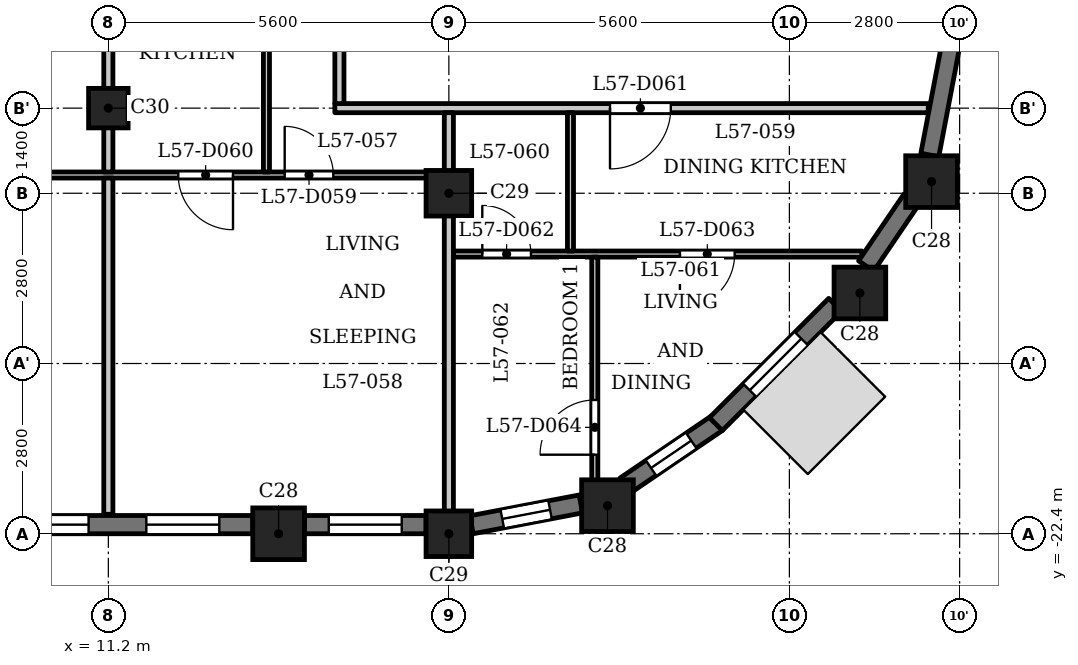
"""IFC4 building model, lengths in metres.
Left out: names, types, materials, properties, quantities, classifications, styles, units other than length and angle.
Written with IfcOpenShell. Run it as: python <this file> out.ifc"""

import sys

from ifc_helpers import new_model, si_unit, direction, frame, frame_2d, origin, origin_2d, place, context, subcontext, project, spatial, rectangle, extrude, element, fill, save


model = new_model("IFC4")
c1 = context("Model", 3, precision=1e-05, world=origin(), true_north=direction((0.0, 1.0)))
c2 = subcontext(c1, "Body", "Model", "MODEL_VIEW")
j1 = project(units=[si_unit("LENGTHUNIT", "METRE"), si_unit("PLANEANGLEUNIT", "RADIAN")], contexts=[c1])
p1 = place(None, origin())
s1 = spatial("IfcSite", under=j1, at=p1, CompositionType="ELEMENT")
p2 = place(p1, origin())
s2 = spatial("IfcBuilding", under=s1, at=p2, CompositionType="ELEMENT")
p3 = place(p2, frame((0.0, 0.0, 220.4)))
s3 = spatial("IfcBuildingStorey", under=s2, at=p3, CompositionType="ELEMENT", Elevation=220.4)
for number, where, z_axis, x_axis in (
    (1, (14.0, -22.4, 0.0), (0.0, 0.0, 1.0), (1.0, 0.0, 0.0)),
    (2, (19.409, -21.938, 0.0), (0.0, 0.0, 1.0), (1.0, 0.0, 0.0)),
    (3, (23.56, -18.44, 0.0), (0.0, 0.0, 1.0), (1.0, 0.0, 0.0)),
    (4, (24.738, -16.609, 0.0), (0.0, 0.0, 1.0), (1.0, 0.0, 0.0)),
):
    element("IfcColumn", number, at=place(p3, frame(where, z_axis=z_axis, x_axis=x_axis)), inside=s3, PredefinedType="COLUMN", context=c2, shape_type="SweptSolid", body=[
        extrude(rectangle(XDim=0.85, YDim=0.85, at=origin_2d()), origin(), (0.0, 0.0, 1.0), 3.5),
    ])
for number, where, z_axis, x_axis in (
    (5, (16.8, -22.4, 0.0), (0.0, 0.0, 1.0), (1.0, 0.0, 0.0)),
    (6, (16.8, -16.8, 0.0), (0.0, 0.0, 1.0), (1.0, 0.0, 0.0)),
):
    element("IfcColumn", number, at=place(p3, frame(where, z_axis=z_axis, x_axis=x_axis)), inside=s3, PredefinedType="COLUMN", context=c2, shape_type="SweptSolid", body=[
        extrude(rectangle(XDim=0.75, YDim=0.75, at=origin_2d()), origin(), (0.0, 0.0, 1.0), 3.5),
    ])
p4 = place(p3, frame((11.2, -15.4, 0.0), z_axis=(0.0, 0.0, 1.0), x_axis=(1.0, 0.0, 0.0)))
e7 = element("IfcColumn", 7, at=p4, inside=s3, PredefinedType="COLUMN", context=c2, shape_type="SweptSolid", body=[
    extrude(rectangle(XDim=0.65, YDim=0.65, at=origin_2d()), origin(), (0.0, 0.0, 1.0), 3.5),
])
p5 = place(p3, frame((8.825, -22.25, 0.0), z_axis=(0.0, 0.0, 1.0), x_axis=(1.0, 0.0, 0.0)))
e8 = element("IfcWall", 8, at=p5, inside=s3, PredefinedType="SOLIDWALL", context=c2, shape_type="SweptSolid", body=[
    extrude(rectangle(XDim=4.75, YDim=0.3, at=frame_2d((2.375, 0.0))), origin(), (0.0, 0.0, 1.0), 2.5),
])
p6 = place(p5, frame((0.25, 0.0, 0.9)))
e9 = element("IfcOpeningElement", 9, at=p6, cuts=e8, PredefinedType="OPENING", context=c2, shape_type="SweptSolid", body=[
    extrude(rectangle(XDim=1.8, YDim=1.25, at=frame_2d((0.9, 0.625))), frame((0.0, 0.16, 0.0), z_axis=(0.0, -1.0, 0.0), x_axis=(1.0, 0.0, 0.0)), (0.0, 0.0, 1.0), 0.32),
])
p7 = place(p5, frame((3.0, 0.0, 0.6)))
e10 = element("IfcOpeningElement", 10, at=p7, cuts=e8, PredefinedType="OPENING", context=c2, shape_type="SweptSolid", body=[
    extrude(rectangle(XDim=1.2, YDim=1.55, at=frame_2d((0.6, 0.775))), frame((0.0, 0.16, 0.0), z_axis=(0.0, -1.0, 0.0), x_axis=(1.0, 0.0, 0.0)), (0.0, 0.0, 1.0), 0.32),
])
p8 = place(p3, frame((14.425, -22.25, 0.0), z_axis=(0.0, 0.0, 1.0), x_axis=(1.0, 0.0, 0.0)))
e11 = element("IfcWall", 11, at=p8, inside=s3, PredefinedType="SOLIDWALL", context=c2, shape_type="SweptSolid", body=[
    extrude(rectangle(XDim=2.0, YDim=0.3, at=frame_2d((1.0, 0.0))), origin(), (0.0, 0.0, 1.0), 2.5),
])
p9 = place(p8, frame((0.4, 0.0, 0.6)))
e12 = element("IfcOpeningElement", 12, at=p9, cuts=e11, PredefinedType="OPENING", context=c2, shape_type="SweptSolid", body=[
    extrude(rectangle(XDim=1.2, YDim=1.55, at=frame_2d((0.6, 0.775))), frame((0.0, 0.16, 0.0), z_axis=(0.0, -1.0, 0.0), x_axis=(1.0, 0.0, 0.0)), (0.0, 0.0, 1.0), 0.32),
])
p10 = place(p3, frame((17.172, -22.253, 0.0), z_axis=(0.0, 0.0, 1.0), x_axis=(0.982300037503, 0.187314271538, 0.0)))
e13 = element("IfcWall", 13, at=p10, inside=s3, PredefinedType="SOLIDWALL", context=c2, shape_type="SweptSolid", body=[
    extrude(rectangle(XDim=1.831, YDim=0.3, at=frame_2d((0.916, 0.0))), origin(), (0.0, 0.0, 1.0), 2.5),
])
p11 = place(p10, frame((0.516, 0.0, 0.6)))
e14 = element("IfcOpeningElement", 14, at=p11, cuts=e13, PredefinedType="OPENING", context=c2, shape_type="SweptSolid", body=[
    extrude(rectangle(XDim=0.8, YDim=1.55, at=frame_2d((0.4, 0.775))), frame((0.0, 0.16, 0.0), z_axis=(0.0, -1.0, 0.0), x_axis=(1.0, 0.0, 0.0)), (0.0, 0.0, 1.0), 0.32),
])
p12 = place(p3, frame((19.698, -21.608, 0.0), z_axis=(0.0, 0.0, 1.0), x_axis=(0.82705295608, 0.562124014644, 0.0)))
e15 = element("IfcWall", 15, at=p12, inside=s3, PredefinedType="SOLIDWALL", context=c2, shape_type="SweptSolid", body=[
    extrude(rectangle(XDim=1.831, YDim=0.3, at=frame_2d((0.916, 0.0))), origin(), (0.0, 0.0, 1.0), 2.5),
])
p13 = place(p12, frame((0.516, 0.0, 0.6)))
e16 = element("IfcOpeningElement", 16, at=p13, cuts=e15, PredefinedType="OPENING", context=c2, shape_type="SweptSolid", body=[
    extrude(rectangle(XDim=0.8, YDim=1.55, at=frame_2d((0.4, 0.775))), frame((0.0, 0.16, 0.0), z_axis=(0.0, -1.0, 0.0), x_axis=(1.0, 0.0, 0.0)), (0.0, 0.0, 1.0), 0.32),
])
p14 = place(p3, frame((21.191, -20.597, 0.0), z_axis=(0.0, 0.0, 1.0), x_axis=(0.707150767798, 0.707062791838, 0.0)))
e17 = element("IfcWall", 17, at=p14, inside=s3, PredefinedType="SOLIDWALL", context=c2, shape_type="SweptSolid", body=[
    extrude(rectangle(XDim=2.775, YDim=0.3, at=frame_2d((1.388, 0.0))), origin(), (0.0, 0.0, 1.0), 2.5),
])
p15 = place(p14, frame((0.788, 0.0, 0.6)))
e18 = element("IfcOpeningElement", 18, at=p15, cuts=e17, PredefinedType="OPENING", context=c2, shape_type="SweptSolid", body=[
    extrude(rectangle(XDim=1.2, YDim=1.55, at=frame_2d((0.6, 0.775))), frame((0.0, 0.16, 0.0), z_axis=(0.0, -1.0, 0.0), x_axis=(1.0, 0.0, 0.0)), (0.0, 0.0, 1.0), 0.32),
])
p16 = place(p3, frame((23.662, -17.996, 0.0), z_axis=(0.0, 0.0, 1.0), x_axis=(0.562149004813, 0.827035970432, 0.0)))
e19 = element("IfcWall", 19, at=p16, inside=s3, PredefinedType="SOLIDWALL", context=c2, shape_type="SweptSolid", body=[
    extrude(rectangle(XDim=1.327, YDim=0.3, at=frame_2d((0.664, 0.0))), origin(), (0.0, 0.0, 1.0), 2.5),
])
p17 = place(p3, frame((24.709, -16.171, 0.0), z_axis=(0.0, 0.0, 1.0), x_axis=(0.187442908742, 0.982275499014, 0.0)))
e20 = element("IfcWall", 20, at=p17, inside=s3, PredefinedType="SOLIDWALL", context=c2, shape_type="SweptSolid", body=[
    extrude(rectangle(XDim=1.831, YDim=0.3, at=frame_2d((0.916, 0.0))), origin(), (0.0, 0.0, 1.0), 2.5),
])
p18 = place(p3, frame((16.875, -17.8, 0.0), z_axis=(0.0, 0.0, 1.0), x_axis=(1.0, 0.0, 0.0)))
e21 = element("IfcWall", 21, at=p18, inside=s3, PredefinedType="PARTITIONING", context=c2, shape_type="SweptSolid", body=[
    extrude(rectangle(XDim=6.719, YDim=0.1, at=frame_2d((3.359, 0.0))), origin(), (0.0, 0.0, 1.0), 3.2),
])
p19 = place(p18, frame((0.475, 0.0, 0.0)))
e22 = element("IfcOpeningElement", 22, at=p19, cuts=e21, PredefinedType="OPENING", context=c2, shape_type="SweptSolid", body=[
    extrude(rectangle(XDim=0.8, YDim=2.1, at=frame_2d((0.4, 1.05))), frame((0.0, 0.06, 0.0), z_axis=(0.0, -1.0, 0.0), x_axis=(1.0, 0.0, 0.0)), (0.0, 0.0, 1.0), 0.12),
])
p20 = place(p18, frame((3.725, 0.0, 0.0)))
e23 = element("IfcOpeningElement", 23, at=p20, cuts=e21, PredefinedType="OPENING", context=c2, shape_type="SweptSolid", body=[
    extrude(rectangle(XDim=0.9, YDim=2.1, at=frame_2d((0.45, 1.05))), frame((0.0, 0.06, 0.0), z_axis=(0.0, -1.0, 0.0), x_axis=(1.0, 0.0, 0.0)), (0.0, 0.0, 1.0), 0.12),
])
p21 = place(p3, frame((-16.725, -16.5, 0.0), z_axis=(0.0, 0.0, 1.0), x_axis=(1.0, 0.0, 0.0)))
e24 = element("IfcWall", 24, at=p21, inside=s3, PredefinedType="PARTITIONING", context=c2, shape_type="SweptSolid", body=[
    extrude(rectangle(XDim=33.45, YDim=0.1, at=frame_2d((16.725, 0.0))), origin(), (0.0, 0.0, 1.0), 3.2),
])
p22 = place(p21, frame((0.675, 0.0, 0.0)))
e25 = element("IfcOpeningElement", 25, at=p22, cuts=e24, PredefinedType="OPENING", context=c2, shape_type="SweptSolid", body=[
    extrude(rectangle(XDim=0.8, YDim=2.1, at=frame_2d((0.4, 1.05))), frame((0.0, 0.06, 0.0), z_axis=(0.0, -1.0, 0.0), x_axis=(1.0, 0.0, 0.0)), (0.0, 0.0, 1.0), 0.12),
])
p23 = place(p21, frame((2.775, 0.0, 0.0)))
e26 = element("IfcOpeningElement", 26, at=p23, cuts=e24, PredefinedType="OPENING", context=c2, shape_type="SweptSolid", body=[
    extrude(rectangle(XDim=0.9, YDim=2.1, at=frame_2d((0.45, 1.05))), frame((0.0, 0.06, 0.0), z_axis=(0.0, -1.0, 0.0), x_axis=(1.0, 0.0, 0.0)), (0.0, 0.0, 1.0), 0.12),
])
p24 = place(p21, frame((6.425, 0.0, 0.0)))
e27 = element("IfcOpeningElement", 27, at=p24, cuts=e24, PredefinedType="OPENING", context=c2, shape_type="SweptSolid", body=[
    extrude(rectangle(XDim=0.8, YDim=2.1, at=frame_2d((0.4, 1.05))), frame((0.0, 0.06, 0.0), z_axis=(0.0, -1.0, 0.0), x_axis=(1.0, 0.0, 0.0)), (0.0, 0.0, 1.0), 0.12),
])
p25 = place(p21, frame((8.775, 0.0, 0.0)))
e28 = element("IfcOpeningElement", 28, at=p25, cuts=e24, PredefinedType="OPENING", context=c2, shape_type="SweptSolid", body=[
    extrude(rectangle(XDim=0.9, YDim=2.1, at=frame_2d((0.45, 1.05))), frame((0.0, 0.06, 0.0), z_axis=(0.0, -1.0, 0.0), x_axis=(1.0, 0.0, 0.0)), (0.0, 0.0, 1.0), 0.12),
])
p26 = place(p21, frame((12.525, 0.0, 0.0)))
e29 = element("IfcOpeningElement", 29, at=p26, cuts=e24, PredefinedType="OPENING", context=c2, shape_type="SweptSolid", body=[
    extrude(rectangle(XDim=0.9, YDim=2.1, at=frame_2d((0.45, 1.05))), frame((0.0, 0.06, 0.0), z_axis=(0.0, -1.0, 0.0), x_axis=(1.0, 0.0, 0.0)), (0.0, 0.0, 1.0), 0.12),
])
p27 = place(p21, frame((14.775, 0.0, 0.0)))
e30 = element("IfcOpeningElement", 30, at=p27, cuts=e24, PredefinedType="OPENING", context=c2, shape_type="SweptSolid", body=[
    extrude(rectangle(XDim=0.9, YDim=2.1, at=frame_2d((0.45, 1.05))), frame((0.0, 0.06, 0.0), z_axis=(0.0, -1.0, 0.0), x_axis=(1.0, 0.0, 0.0)), (0.0, 0.0, 1.0), 0.12),
])
p28 = place(p21, frame((25.475, 0.0, 0.0)))
e31 = element("IfcOpeningElement", 31, at=p28, cuts=e24, PredefinedType="OPENING", context=c2, shape_type="SweptSolid", body=[
    extrude(rectangle(XDim=0.8, YDim=2.1, at=frame_2d((0.4, 1.05))), frame((0.0, 0.06, 0.0), z_axis=(0.0, -1.0, 0.0), x_axis=(1.0, 0.0, 0.0)), (0.0, 0.0, 1.0), 0.12),
])
p29 = place(p21, frame((23.225, 0.0, 0.0)))
e32 = element("IfcOpeningElement", 32, at=p29, cuts=e24, PredefinedType="OPENING", context=c2, shape_type="SweptSolid", body=[
    extrude(rectangle(XDim=0.9, YDim=2.1, at=frame_2d((0.45, 1.05))), frame((0.0, 0.06, 0.0), z_axis=(0.0, -1.0, 0.0), x_axis=(1.0, 0.0, 0.0)), (0.0, 0.0, 1.0), 0.12),
])
p30 = place(p21, frame((17.875, 0.0, 0.0)))
e33 = element("IfcOpeningElement", 33, at=p30, cuts=e24, PredefinedType="OPENING", context=c2, shape_type="SweptSolid", body=[
    extrude(rectangle(XDim=0.9, YDim=2.1, at=frame_2d((0.45, 1.05))), frame((0.0, 0.06, 0.0), z_axis=(0.0, -1.0, 0.0), x_axis=(1.0, 0.0, 0.0)), (0.0, 0.0, 1.0), 0.12),
])
p31 = place(p21, frame((19.975, 0.0, 0.0)))
e34 = element("IfcOpeningElement", 34, at=p31, cuts=e24, PredefinedType="OPENING", context=c2, shape_type="SweptSolid", body=[
    extrude(rectangle(XDim=0.9, YDim=2.1, at=frame_2d((0.45, 1.05))), frame((0.0, 0.06, 0.0), z_axis=(0.0, -1.0, 0.0), x_axis=(1.0, 0.0, 0.0)), (0.0, 0.0, 1.0), 0.12),
])
p32 = place(p21, frame((30.825, 0.0, 0.0)))
e35 = element("IfcOpeningElement", 35, at=p32, cuts=e24, PredefinedType="OPENING", context=c2, shape_type="SweptSolid", body=[
    extrude(rectangle(XDim=0.8, YDim=2.1, at=frame_2d((0.4, 1.05))), frame((0.0, 0.06, 0.0), z_axis=(0.0, -1.0, 0.0), x_axis=(1.0, 0.0, 0.0)), (0.0, 0.0, 1.0), 0.12),
])
p33 = place(p21, frame((29.075, 0.0, 0.0)))
e36 = element("IfcOpeningElement", 36, at=p33, cuts=e24, PredefinedType="OPENING", context=c2, shape_type="SweptSolid", body=[
    extrude(rectangle(XDim=0.9, YDim=2.1, at=frame_2d((0.45, 1.05))), frame((0.0, 0.06, 0.0), z_axis=(0.0, -1.0, 0.0), x_axis=(1.0, 0.0, 0.0)), (0.0, 0.0, 1.0), 0.12),
])
p34 = place(p3, frame((14.925, -15.4, 0.0), z_axis=(0.0, 0.0, 1.0), x_axis=(1.0, 0.0, 0.0)))
e37 = element("IfcWall", 37, at=p34, inside=s3, PredefinedType="PARTITIONING", context=c2, shape_type="SweptSolid", body=[
    extrude(rectangle(XDim=9.759, YDim=0.15, at=frame_2d((4.879, 0.0))), origin(), (0.0, 0.0, 1.0), 3.2),
])
p35 = place(p34, frame((4.525, 0.0, 0.0)))
e38 = element("IfcOpeningElement", 38, at=p35, cuts=e37, PredefinedType="OPENING", context=c2, shape_type="SweptSolid", body=[
    extrude(rectangle(XDim=1.0, YDim=2.1, at=frame_2d((0.5, 1.05))), frame((0.0, 0.085, 0.0), z_axis=(0.0, -1.0, 0.0), x_axis=(1.0, 0.0, 0.0)), (0.0, 0.0, 1.0), 0.17),
])
p36 = place(p3, frame((11.2, -22.08, 0.0), z_axis=(0.0, 0.0, 1.0), x_axis=(0.0, 1.0, 0.0)))
e39 = element("IfcWall", 39, at=p36, inside=s3, PredefinedType="PARTITIONING", context=c2, shape_type="SweptSolid", body=[
    extrude(rectangle(XDim=5.53, YDim=0.15, at=frame_2d((2.765, 0.0))), origin(), (0.0, 0.0, 1.0), 3.2),
])
p37 = place(p3, frame((11.2, -16.45, 0.0), z_axis=(0.0, 0.0, 1.0), x_axis=(0.0, 1.0, 0.0)))
e40 = element("IfcWall", 40, at=p37, inside=s3, PredefinedType="PARTITIONING", context=c2, shape_type="SweptSolid", body=[
    extrude(rectangle(XDim=3.175, YDim=0.15, at=frame_2d((1.587, 0.0))), origin(), (0.0, 0.0, 1.0), 3.2),
])
p38 = place(p3, frame((13.8, -16.45, 0.0), z_axis=(0.0, 0.0, 1.0), x_axis=(0.0, 1.0, 0.0)))
e41 = element("IfcWall", 41, at=p38, inside=s3, PredefinedType="PARTITIONING", context=c2, shape_type="SweptSolid", body=[
    extrude(rectangle(XDim=3.175, YDim=0.1, at=frame_2d((1.587, 0.0))), origin(), (0.0, 0.0, 1.0), 3.2),
])
p39 = place(p3, frame((15.0, -15.325, 0.0), z_axis=(0.0, 0.0, 1.0), x_axis=(0.0, 1.0, 0.0)))
e42 = element("IfcWall", 42, at=p39, inside=s3, PredefinedType="PARTITIONING", context=c2, shape_type="SweptSolid", body=[
    extrude(rectangle(XDim=2.05, YDim=0.15, at=frame_2d((1.025, 0.0))), origin(), (0.0, 0.0, 1.0), 3.2),
])
p40 = place(p3, frame((16.8, -22.31, 0.0), z_axis=(0.0, 0.0, 1.0), x_axis=(0.0, 1.0, 0.0)))
e43 = element("IfcWall", 43, at=p40, inside=s3, PredefinedType="PARTITIONING", context=c2, shape_type="SweptSolid", body=[
    extrude(rectangle(XDim=6.835, YDim=0.15, at=frame_2d((3.417, 0.0))), origin(), (0.0, 0.0, 1.0), 2.55),
])
p41 = place(p3, frame((18.8, -17.75, 0.0), z_axis=(0.0, 0.0, 1.0), x_axis=(0.0, 1.0, 0.0)))
e44 = element("IfcWall", 44, at=p41, inside=s3, PredefinedType="PARTITIONING", context=c2, shape_type="SweptSolid", body=[
    extrude(rectangle(XDim=2.275, YDim=0.1, at=frame_2d((1.137, 0.0))), origin(), (0.0, 0.0, 1.0), 3.2),
])
p42 = place(p3, frame((19.2, -21.92, 0.0), z_axis=(0.0, 0.0, 1.0), x_axis=(0.0, 1.0, 0.0)))
e45 = element("IfcWall", 45, at=p42, inside=s3, PredefinedType="PARTITIONING", context=c2, shape_type="SweptSolid", body=[
    extrude(rectangle(XDim=4.07, YDim=0.1, at=frame_2d((2.035, 0.0))), origin(), (0.0, 0.0, 1.0), 3.2),
])
p43 = place(p42, frame((0.82, 0.0, 0.0)))
e46 = element("IfcOpeningElement", 46, at=p43, cuts=e45, PredefinedType="OPENING", context=c2, shape_type="SweptSolid", body=[
    extrude(rectangle(XDim=0.9, YDim=2.1, at=frame_2d((0.45, 1.05))), frame((0.0, 0.06, 0.0), z_axis=(0.0, -1.0, 0.0), x_axis=(1.0, 0.0, 0.0)), (0.0, 0.0, 1.0), 0.12),
])
p44 = place(p32, origin())
e47 = element("IfcDoor", 47, at=p44, inside=s3, OperationType="SINGLE_SWING_RIGHT", PredefinedType="DOOR", context=c2, shape_type="SweptSolid", body=[
    extrude(rectangle(XDim=0.8, YDim=2.1, at=frame_2d((0.4, 1.05))), frame((0.0, 0.025, 0.0), z_axis=(0.0, -1.0, 0.0), x_axis=(1.0, 0.0, 0.0)), (0.0, 0.0, 1.0), 0.05),
])
fill(e35, e47)
p45 = place(p33, origin())
e48 = element("IfcDoor", 48, at=p45, inside=s3, OperationType="SINGLE_SWING_RIGHT", PredefinedType="DOOR", context=c2, shape_type="SweptSolid", body=[
    extrude(rectangle(XDim=0.9, YDim=2.1, at=frame_2d((0.45, 1.05))), frame((0.0, 0.025, 0.0), z_axis=(0.0, -1.0, 0.0), x_axis=(1.0, 0.0, 0.0)), (0.0, 0.0, 1.0), 0.05),
])
fill(e36, e48)
p46 = place(p35, origin())
e49 = element("IfcDoor", 49, at=p46, inside=s3, OperationType="SINGLE_SWING_LEFT", PredefinedType="DOOR", context=c2, shape_type="SweptSolid", body=[
    extrude(rectangle(XDim=1.0, YDim=2.1, at=frame_2d((0.5, 1.05))), frame((0.0, 0.025, 0.0), z_axis=(0.0, -1.0, 0.0), x_axis=(1.0, 0.0, 0.0)), (0.0, 0.0, 1.0), 0.05),
])
fill(e38, e49)
p47 = place(p19, origin())
e50 = element("IfcDoor", 50, at=p47, inside=s3, OperationType="SINGLE_SWING_RIGHT", PredefinedType="DOOR", context=c2, shape_type="SweptSolid", body=[
    extrude(rectangle(XDim=0.8, YDim=2.1, at=frame_2d((0.4, 1.05))), frame((0.0, 0.025, 0.0), z_axis=(0.0, -1.0, 0.0), x_axis=(1.0, 0.0, 0.0)), (0.0, 0.0, 1.0), 0.05),
])
fill(e22, e50)
p48 = place(p20, origin())
e51 = element("IfcDoor", 51, at=p48, inside=s3, OperationType="SINGLE_SWING_LEFT", PredefinedType="DOOR", context=c2, shape_type="SweptSolid", body=[
    extrude(rectangle(XDim=0.9, YDim=2.1, at=frame_2d((0.45, 1.05))), frame((0.0, 0.025, 0.0), z_axis=(0.0, -1.0, 0.0), x_axis=(1.0, 0.0, 0.0)), (0.0, 0.0, 1.0), 0.05),
])
fill(e23, e51)
p49 = place(p43, origin())
e52 = element("IfcDoor", 52, at=p49, inside=s3, OperationType="SINGLE_SWING_RIGHT", PredefinedType="DOOR", context=c2, shape_type="SweptSolid", body=[
    extrude(rectangle(XDim=0.9, YDim=2.1, at=frame_2d((0.45, 1.05))), frame((0.0, 0.025, 0.0), z_axis=(0.0, -1.0, 0.0), x_axis=(1.0, 0.0, 0.0)), (0.0, 0.0, 1.0), 0.05),
])
fill(e46, e52)
p50 = place(p6, origin())
e53 = element("IfcWindow", 53, at=p50, inside=s3, PartitioningType="SINGLE_PANEL", PredefinedType="WINDOW", context=c2, shape_type="SweptSolid", body=[
    extrude(rectangle(XDim=1.8, YDim=1.25, at=frame_2d((0.9, 0.625))), frame((0.0, 0.03, 0.0), z_axis=(0.0, -1.0, 0.0), x_axis=(1.0, 0.0, 0.0)), (0.0, 0.0, 1.0), 0.06),
])
fill(e9, e53)
p51 = place(p7, origin())
e54 = element("IfcWindow", 54, at=p51, inside=s3, PartitioningType="SINGLE_PANEL", PredefinedType="WINDOW", context=c2, shape_type="SweptSolid", body=[
    extrude(rectangle(XDim=1.2, YDim=1.55, at=frame_2d((0.6, 0.775))), frame((0.0, 0.03, 0.0), z_axis=(0.0, -1.0, 0.0), x_axis=(1.0, 0.0, 0.0)), (0.0, 0.0, 1.0), 0.06),
])
fill(e10, e54)
p52 = place(p9, origin())
e55 = element("IfcWindow", 55, at=p52, inside=s3, PartitioningType="SINGLE_PANEL", PredefinedType="WINDOW", context=c2, shape_type="SweptSolid", body=[
    extrude(rectangle(XDim=1.2, YDim=1.55, at=frame_2d((0.6, 0.775))), frame((0.0, 0.03, 0.0), z_axis=(0.0, -1.0, 0.0), x_axis=(1.0, 0.0, 0.0)), (0.0, 0.0, 1.0), 0.06),
])
fill(e12, e55)
p53 = place(p11, origin())
e56 = element("IfcWindow", 56, at=p53, inside=s3, PartitioningType="SINGLE_PANEL", PredefinedType="WINDOW", context=c2, shape_type="SweptSolid", body=[
    extrude(rectangle(XDim=0.8, YDim=1.55, at=frame_2d((0.4, 0.775))), frame((0.0, 0.03, 0.0), z_axis=(0.0, -1.0, 0.0), x_axis=(1.0, 0.0, 0.0)), (0.0, 0.0, 1.0), 0.06),
])
fill(e14, e56)
p54 = place(p13, origin())
e57 = element("IfcWindow", 57, at=p54, inside=s3, PartitioningType="SINGLE_PANEL", PredefinedType="WINDOW", context=c2, shape_type="SweptSolid", body=[
    extrude(rectangle(XDim=0.8, YDim=1.55, at=frame_2d((0.4, 0.775))), frame((0.0, 0.03, 0.0), z_axis=(0.0, -1.0, 0.0), x_axis=(1.0, 0.0, 0.0)), (0.0, 0.0, 1.0), 0.06),
])
fill(e16, e57)
p55 = place(p15, origin())
e58 = element("IfcWindow", 58, at=p55, inside=s3, PartitioningType="SINGLE_PANEL", PredefinedType="WINDOW", context=c2, shape_type="SweptSolid", body=[
    extrude(rectangle(XDim=1.2, YDim=1.55, at=frame_2d((0.6, 0.775))), frame((0.0, 0.03, 0.0), z_axis=(0.0, -1.0, 0.0), x_axis=(1.0, 0.0, 0.0)), (0.0, 0.0, 1.0), 0.06),
])
fill(e18, e58)
save(model, sys.argv[1])
